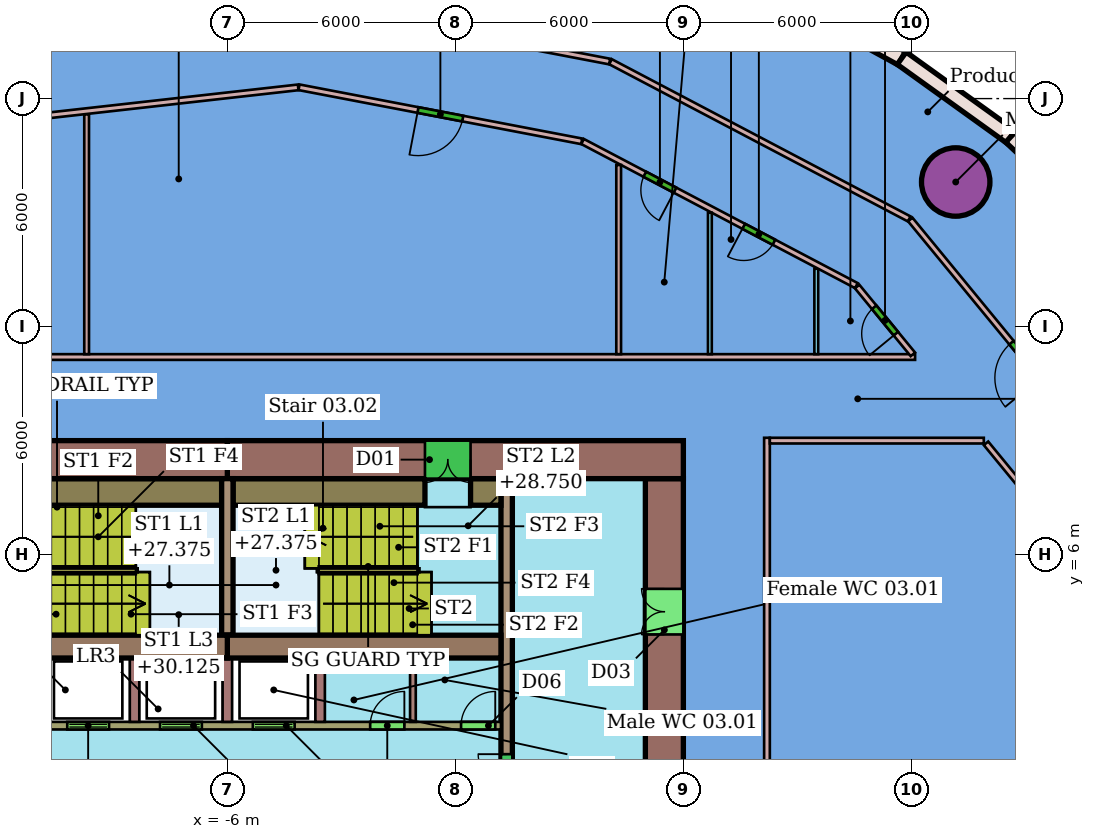
"""IFC4 building model, lengths in metres.
Left out: names, types, materials, properties, quantities, classifications, styles, units other than length and angle.
Written with IfcOpenShell. Run it as: python <this file> out.ifc"""

import sys

from ifc_helpers import new_model, si_unit, direction, frame, frame_2d, origin, origin_2d, place, context, subcontext, project, spatial, rectangle, hollow_circle, extrude, element, fill, save


model = new_model("IFC4")
c1 = context("Model", 3, precision=1e-05, world=origin(), true_north=direction((0.0, 1.0)))
c2 = subcontext(c1, "Body", "Model", "MODEL_VIEW")
j1 = project(units=[si_unit("LENGTHUNIT", "METRE"), si_unit("PLANEANGLEUNIT", "RADIAN")], contexts=[c1])
p1 = place(None, origin())
s1 = spatial("IfcSite", under=j1, at=p1, CompositionType="ELEMENT")
p2 = place(p1, origin())
s2 = spatial("IfcBuilding", under=s1, at=p2, CompositionType="ELEMENT")
p3 = place(p2, frame((0.0, 0.0, 26.0)))
s3 = spatial("IfcBuildingStorey", under=s2, at=p3, CompositionType="ELEMENT", Elevation=26.0)
p4 = place(p3, frame((13.166, 15.805, 0.0), z_axis=(0.0, 0.0, 1.0), x_axis=(1.0, 0.0, 0.0)))
e1 = element("IfcColumn", 1, at=p4, inside=s3, PredefinedType="COLUMN", context=c2, shape_type="SweptSolid", body=[
    extrude(hollow_circle(Radius=0.9, WallThickness=0.06, at=origin_2d()), origin(), (0.0, 0.0, 1.0), 5.3),
])
p5 = place(p3, frame((-20.275, 11.2, 0.0), z_axis=(0.0, 0.0, 1.0), x_axis=(1.0, 0.0, 0.0)))
e2 = element("IfcWall", 2, at=p5, inside=s3, PredefinedType="PARTITIONING", context=c2, shape_type="SweptSolid", body=[
    extrude(rectangle(XDim=32.372, YDim=0.15, at=frame_2d((16.186, 0.0))), origin(), (0.0, 0.0, 1.0), 4.6),
])
p6 = place(p3, frame((8.2, -11.275, 0.0), z_axis=(0.0, 0.0, 1.0), x_axis=(0.0, 1.0, 0.0)))
e3 = element("IfcWall", 3, at=p6, inside=s3, PredefinedType="PARTITIONING", context=c2, shape_type="SweptSolid", body=[
    extrude(rectangle(XDim=20.35, YDim=0.15, at=frame_2d((10.175, 0.0))), origin(), (0.0, 0.0, 1.0), 4.6),
])
p7 = place(p3, frame((8.275, 9.0, 0.0), z_axis=(0.0, 0.0, 1.0), x_axis=(1.0, 0.0, 0.0)))
e4 = element("IfcWall", 4, at=p7, inside=s3, PredefinedType="PARTITIONING", context=c2, shape_type="SweptSolid", body=[
    extrude(rectangle(XDim=5.631, YDim=0.15, at=frame_2d((2.815, 0.0))), origin(), (0.0, 0.0, 1.0), 4.6),
])
p8 = place(p3, frame((9.497, 11.275, 0.0), z_axis=(0.0, 0.0, 1.0), x_axis=(0.0, 1.0, 0.0)))
e5 = element("IfcWall", 5, at=p8, inside=s3, PredefinedType="PARTITIONING", context=c2, shape_type="SweptSolid", body=[
    extrude(rectangle(XDim=2.248, YDim=0.1, at=frame_2d((1.124, 0.0))), origin(), (0.0, 0.0, 1.0), 4.6),
])
p9 = place(p3, frame((12.039, 11.271, 0.0), z_axis=(0.0, 0.0, 1.0), x_axis=(-0.634980634047, 0.772528054109, 0.0)))
e6 = element("IfcWall", 6, at=p9, inside=s3, PredefinedType="PARTITIONING", context=c2, shape_type="SweptSolid", body=[
    extrude(rectangle(XDim=2.309, YDim=0.15, at=frame_2d((1.155, 0.0))), origin(), (0.0, 0.0, 1.0), 4.6),
])
p10 = place(p9, frame((0.705, 0.0, 0.0)))
e7 = element("IfcOpeningElement", 7, at=p10, cuts=e6, PredefinedType="OPENING", context=c2, shape_type="SweptSolid", body=[
    extrude(rectangle(XDim=0.9, YDim=2.1, at=frame_2d((0.45, 1.05))), frame((0.0, 0.085, 0.0), z_axis=(0.0, -1.0, 0.0), x_axis=(1.0, 0.0, 0.0)), (0.0, 0.0, 1.0), 0.17),
])
p11 = place(p3, frame((13.964, 8.929, 0.0), z_axis=(0.0, 0.0, 1.0), x_axis=(0.635017397711, -0.772497834692, 0.0)))
e8 = element("IfcWall", 8, at=p11, inside=s3, PredefinedType="PARTITIONING", context=c2, shape_type="SweptSolid", body=[
    extrude(rectangle(XDim=3.09, YDim=0.15, at=frame_2d((1.545, 0.0))), origin(), (0.0, 0.0, 1.0), 4.6),
])
p12 = place(p3, frame((10.553, 13.079, 0.0), z_axis=(0.0, 0.0, 1.0), x_axis=(-0.884926027541, 0.46573160273, 0.0)))
e9 = element("IfcWall", 9, at=p12, inside=s3, PredefinedType="PARTITIONING", context=c2, shape_type="SweptSolid", body=[
    extrude(rectangle(XDim=8.142, YDim=0.15, at=frame_2d((4.071, 0.0))), origin(), (0.0, 0.0, 1.0), 4.6),
])
p13 = place(p12, frame((2.451, 0.0, 0.0)))
e10 = element("IfcOpeningElement", 10, at=p13, cuts=e9, PredefinedType="OPENING", context=c2, shape_type="SweptSolid", body=[
    extrude(rectangle(XDim=0.9, YDim=2.1, at=frame_2d((0.45, 1.05))), frame((0.0, 0.085, 0.0), z_axis=(0.0, -1.0, 0.0), x_axis=(1.0, 0.0, 0.0)), (0.0, 0.0, 1.0), 0.17),
])
p14 = place(p12, frame((5.392, 0.0, 0.0)))
e11 = element("IfcOpeningElement", 11, at=p14, cuts=e9, PredefinedType="OPENING", context=c2, shape_type="SweptSolid", body=[
    extrude(rectangle(XDim=0.9, YDim=2.1, at=frame_2d((0.45, 1.05))), frame((0.0, 0.085, 0.0), z_axis=(0.0, -1.0, 0.0), x_axis=(1.0, 0.0, 0.0)), (0.0, 0.0, 1.0), 0.17),
])
p15 = place(p3, frame((6.697, 11.275, 0.0), z_axis=(0.0, 0.0, 1.0), x_axis=(0.0, 1.0, 0.0)))
e12 = element("IfcWall", 12, at=p15, inside=s3, PredefinedType="PARTITIONING", context=c2, shape_type="SweptSolid", body=[
    extrude(rectangle(XDim=3.722, YDim=0.1, at=frame_2d((1.861, 0.0))), origin(), (0.0, 0.0, 1.0), 4.6),
])
p16 = place(p3, frame((4.297, 11.275, 0.0), z_axis=(0.0, 0.0, 1.0), x_axis=(0.0, 1.0, 0.0)))
e13 = element("IfcWall", 13, at=p16, inside=s3, PredefinedType="PARTITIONING", context=c2, shape_type="SweptSolid", body=[
    extrude(rectangle(XDim=4.979, YDim=0.125, at=frame_2d((2.489, 0.0))), origin(), (0.0, 0.0, 1.0), 4.6),
])
p17 = place(p3, frame((-9.703, 11.275, 0.0), z_axis=(0.0, 0.0, 1.0), x_axis=(0.0, 1.0, 0.0)))
e14 = element("IfcWall", 14, at=p17, inside=s3, PredefinedType="PARTITIONING", context=c2, shape_type="SweptSolid", body=[
    extrude(rectangle(XDim=6.313, YDim=0.125, at=frame_2d((3.156, 0.0))), origin(), (0.0, 0.0, 1.0), 4.6),
])
p18 = place(p3, frame((3.325, 16.875, 0.0), z_axis=(0.0, 0.0, 1.0), x_axis=(-0.982205706766, 0.187808278828, 0.0)))
e15 = element("IfcWall", 15, at=p18, inside=s3, PredefinedType="PARTITIONING", context=c2, shape_type="SweptSolid", body=[
    extrude(rectangle(XDim=7.573, YDim=0.15, at=frame_2d((3.787, 0.0))), origin(), (0.0, 0.0, 1.0), 4.6),
])
p19 = place(p18, frame((3.187, 0.0, 0.0)))
e16 = element("IfcOpeningElement", 16, at=p19, cuts=e15, PredefinedType="OPENING", context=c2, shape_type="SweptSolid", body=[
    extrude(rectangle(XDim=1.2, YDim=2.1, at=frame_2d((0.6, 1.05))), frame((0.0, 0.085, 0.0), z_axis=(0.0, -1.0, 0.0), x_axis=(1.0, 0.0, 0.0)), (0.0, 0.0, 1.0), 0.17),
])
p20 = place(p3, frame((-11.425, 17.477, 0.0), z_axis=(0.0, 0.0, 1.0), x_axis=(0.993762158865, 0.111520274427, 0.0)))
e17 = element("IfcWall", 17, at=p20, inside=s3, PredefinedType="PARTITIONING", context=c2, shape_type="SweptSolid", body=[
    extrude(rectangle(XDim=7.334, YDim=0.15, at=frame_2d((3.667, 0.0))), origin(), (0.0, 0.0, 1.0), 4.6),
])
p21 = place(p3, frame((18.06, 7.411, 0.0), z_axis=(0.0, 0.0, 1.0), x_axis=(-0.63502168635, 0.772494309277, 0.0)))
e18 = element("IfcWall", 18, at=p21, inside=s3, PredefinedType="PARTITIONING", context=c2, shape_type="SweptSolid", body=[
    extrude(rectangle(XDim=9.59, YDim=0.15, at=frame_2d((4.795, 0.0))), origin(), (0.0, 0.0, 1.0), 4.6),
])
p22 = place(p21, frame((4.195, 0.0, 0.0)))
e19 = element("IfcOpeningElement", 19, at=p22, cuts=e18, PredefinedType="OPENING", context=c2, shape_type="SweptSolid", body=[
    extrude(rectangle(XDim=1.2, YDim=2.1, at=frame_2d((0.6, 1.05))), frame((0.0, 0.085, 0.0), z_axis=(0.0, -1.0, 0.0), x_axis=(1.0, 0.0, 0.0)), (0.0, 0.0, 1.0), 0.17),
])
p23 = place(p3, frame((4.083, 18.97, 0.0), z_axis=(0.0, 0.0, 1.0), x_axis=(0.884920607371, -0.465741901326, 0.0)))
e20 = element("IfcWall", 20, at=p23, inside=s3, PredefinedType="PARTITIONING", context=c2, shape_type="SweptSolid", body=[
    extrude(rectangle(XDim=8.882, YDim=0.15, at=frame_2d((4.441, 0.0))), origin(), (0.0, 0.0, 1.0), 4.6),
])
p24 = place(p3, frame((-4.028, 20.521, 0.0), z_axis=(0.0, 0.0, 1.0), x_axis=(0.982207009241, -0.187801466976, 0.0)))
e21 = element("IfcWall", 21, at=p24, inside=s3, PredefinedType="PARTITIONING", context=c2, shape_type="SweptSolid", body=[
    extrude(rectangle(XDim=8.234, YDim=0.15, at=frame_2d((4.117, 0.0))), origin(), (0.0, 0.0, 1.0), 4.6),
])
p25 = place(p3, frame((8.571, 20.8, 0.0), z_axis=(0.0, 0.0, 1.0), x_axis=(0.87711318505, -0.48028372928, 0.0)))
e22 = element("IfcWall", 22, at=p25, inside=s3, PredefinedType="SOLIDWALL", context=c2, shape_type="SweptSolid", body=[
    extrude(rectangle(XDim=3.619, YDim=0.4, at=frame_2d((1.809, 0.0))), origin(), (0.0, 0.0, 1.0), 4.9),
])
p26 = place(p3, frame((11.745, 19.062, 0.0), z_axis=(0.0, 0.0, 1.0), x_axis=(0.81205624831, -0.583579171648, 0.0)))
e23 = element("IfcWall", 23, at=p26, inside=s3, PredefinedType="SOLIDWALL", context=c2, shape_type="SweptSolid", body=[
    extrude(rectangle(XDim=3.538, YDim=0.4, at=frame_2d((1.769, 0.0))), origin(), (0.0, 0.0, 1.0), 4.9),
])
p27 = place(p3, frame((14.618, 16.997, 0.0), z_axis=(0.0, 0.0, 1.0), x_axis=(0.730641209912, -0.682761614605, 0.0)))
e24 = element("IfcWall", 24, at=p27, inside=s3, PredefinedType="SOLIDWALL", context=c2, shape_type="SweptSolid", body=[
    extrude(rectangle(XDim=3.452, YDim=0.4, at=frame_2d((1.726, 0.0))), origin(), (0.0, 0.0, 1.0), 4.9),
])
p28 = place(p3, frame((6.0, 8.5, 0.0), z_axis=(0.0, 0.0, 1.0), x_axis=(-1.0, 0.0, 0.0)))
e25 = element("IfcWall", 25, at=p28, inside=s3, PredefinedType="SHEAR", context=c2, shape_type="SweptSolid", body=[
    extrude(rectangle(XDim=12.0, YDim=1.0, at=frame_2d((6.0, 0.0))), origin(), (0.0, 0.0, 1.0), 5.2),
])
p29 = place(p28, frame((5.6, 0.0, 0.0)))
e26 = element("IfcOpeningElement", 26, at=p29, cuts=e25, PredefinedType="OPENING", context=c2, shape_type="SweptSolid", body=[
    extrude(rectangle(XDim=1.2, YDim=2.1, at=frame_2d((0.6, 1.05))), frame((0.0, 0.51, 0.0), z_axis=(0.0, -1.0, 0.0), x_axis=(1.0, 0.0, 0.0)), (0.0, 0.0, 1.0), 1.02),
])
p30 = place(p3, frame((-6.0, 8.5, 0.0), z_axis=(0.0, 0.0, 1.0), x_axis=(-1.0, 0.0, 0.0)))
e27 = element("IfcWall", 27, at=p30, inside=s3, PredefinedType="SHEAR", context=c2, shape_type="SweptSolid", body=[
    extrude(rectangle(XDim=12.0, YDim=1.0, at=frame_2d((6.0, 0.0))), origin(), (0.0, 0.0, 1.0), 5.2),
])
p31 = place(p30, frame((5.2, 0.0, 0.0)))
e28 = element("IfcOpeningElement", 28, at=p31, cuts=e27, PredefinedType="OPENING", context=c2, shape_type="SweptSolid", body=[
    extrude(rectangle(XDim=1.2, YDim=2.1, at=frame_2d((0.6, 1.05))), frame((0.0, 0.51, 0.0), z_axis=(0.0, -1.0, 0.0), x_axis=(1.0, 0.0, 0.0)), (0.0, 0.0, 1.0), 1.02),
])
p32 = place(p3, frame((5.5, -8.0, 0.0), z_axis=(0.0, 0.0, 1.0), x_axis=(0.0, 1.0, 0.0)))
e29 = element("IfcWall", 29, at=p32, inside=s3, PredefinedType="SHEAR", context=c2, shape_type="SweptSolid", body=[
    extrude(rectangle(XDim=16.0, YDim=1.0, at=frame_2d((8.0, 0.0))), origin(), (0.0, 0.0, 1.0), 5.2),
])
p33 = place(p32, frame((2.9, 0.0, 0.0)))
e30 = element("IfcOpeningElement", 30, at=p33, cuts=e29, PredefinedType="OPENING", context=c2, shape_type="SweptSolid", body=[
    extrude(rectangle(XDim=1.2, YDim=2.1, at=frame_2d((0.6, 1.05))), frame((0.0, 0.51, 0.0), z_axis=(0.0, -1.0, 0.0), x_axis=(1.0, 0.0, 0.0)), (0.0, 0.0, 1.0), 1.02),
])
p34 = place(p32, frame((11.9, 0.0, 0.0)))
e31 = element("IfcOpeningElement", 31, at=p34, cuts=e29, PredefinedType="OPENING", context=c2, shape_type="SweptSolid", body=[
    extrude(rectangle(XDim=1.2, YDim=2.1, at=frame_2d((0.6, 1.05))), frame((0.0, 0.51, 0.0), z_axis=(0.0, -1.0, 0.0), x_axis=(1.0, 0.0, 0.0)), (0.0, 0.0, 1.0), 1.02),
])
for number, where, z_axis, x_axis in (
    (32, (-13.2, 3.58, 0.0), (0.0, 0.0, 1.0), (1.0, 0.0, 0.0)),
    (33, (-6.0, 3.58, 0.0), (0.0, 0.0, 1.0), (1.0, 0.0, 0.0)),
):
    element("IfcWall", number, at=place(p3, frame(where, z_axis=z_axis, x_axis=x_axis)), inside=s3, PredefinedType="SHEAR", context=c2, shape_type="SweptSolid", body=[
        extrude(rectangle(XDim=7.2, YDim=0.6, at=frame_2d((3.6, 0.0))), origin(), (0.0, 0.0, 1.0), 5.2),
    ])
p35 = place(p3, frame((1.35, -8.0, 0.0), z_axis=(0.0, 0.0, 1.0), x_axis=(0.0, 1.0, 0.0)))
e34 = element("IfcWall", 34, at=p35, inside=s3, PredefinedType="SHEAR", context=c2, shape_type="SweptSolid", body=[
    extrude(rectangle(XDim=16.0, YDim=0.3, at=frame_2d((8.0, 0.0))), origin(), (0.0, 0.0, 1.0), 5.2),
])
p36 = place(p35, frame((1.91, 0.0, 0.0)))
e35 = element("IfcOpeningElement", 35, at=p36, cuts=e34, PredefinedType="OPENING", context=c2, shape_type="SweptSolid", body=[
    extrude(rectangle(XDim=1.0, YDim=2.1, at=frame_2d((0.5, 1.05))), frame((0.0, 0.16, 0.0), z_axis=(0.0, -1.0, 0.0), x_axis=(1.0, 0.0, 0.0)), (0.0, 0.0, 1.0), 0.32),
])
p37 = place(p35, frame((7.25, 0.0, 0.0)))
e36 = element("IfcOpeningElement", 36, at=p37, cuts=e34, PredefinedType="OPENING", context=c2, shape_type="SweptSolid", body=[
    extrude(rectangle(XDim=1.5, YDim=2.1, at=frame_2d((0.75, 1.05))), frame((0.0, 0.16, 0.0), z_axis=(0.0, -1.0, 0.0), x_axis=(1.0, 0.0, 0.0)), (0.0, 0.0, 1.0), 0.32),
])
p38 = place(p3, frame((-13.2, 1.5, 0.0), z_axis=(0.0, 0.0, 1.0), x_axis=(1.0, 0.0, 0.0)))
e37 = element("IfcWall", 37, at=p38, inside=s3, PredefinedType="SHEAR", context=c2, shape_type="SweptSolid", body=[
    extrude(rectangle(XDim=14.4, YDim=0.2, at=frame_2d((7.2, 0.0))), origin(), (0.0, 0.0, 1.0), 5.2),
])
p39 = place(p38, frame((0.546, 0.0, 0.0)))
e38 = element("IfcOpeningElement", 38, at=p39, cuts=e37, PredefinedType="OPENING", context=c2, shape_type="SweptSolid", body=[
    extrude(rectangle(XDim=1.1, YDim=2.1, at=frame_2d((0.55, 1.05))), frame((0.0, 0.11, 0.0), z_axis=(0.0, -1.0, 0.0), x_axis=(1.0, 0.0, 0.0)), (0.0, 0.0, 1.0), 0.22),
])
p40 = place(p38, frame((2.988, 0.0, 0.0)))
e39 = element("IfcOpeningElement", 39, at=p40, cuts=e37, PredefinedType="OPENING", context=c2, shape_type="SweptSolid", body=[
    extrude(rectangle(XDim=1.1, YDim=2.1, at=frame_2d((0.55, 1.05))), frame((0.0, 0.11, 0.0), z_axis=(0.0, -1.0, 0.0), x_axis=(1.0, 0.0, 0.0)), (0.0, 0.0, 1.0), 0.22),
])
p41 = place(p38, frame((5.429, 0.0, 0.0)))
e40 = element("IfcOpeningElement", 40, at=p41, cuts=e37, PredefinedType="OPENING", context=c2, shape_type="SweptSolid", body=[
    extrude(rectangle(XDim=1.1, YDim=2.1, at=frame_2d((0.55, 1.05))), frame((0.0, 0.11, 0.0), z_axis=(0.0, -1.0, 0.0), x_axis=(1.0, 0.0, 0.0)), (0.0, 0.0, 1.0), 0.22),
])
p42 = place(p38, frame((7.871, 0.0, 0.0)))
e41 = element("IfcOpeningElement", 41, at=p42, cuts=e37, PredefinedType="OPENING", context=c2, shape_type="SweptSolid", body=[
    extrude(rectangle(XDim=1.1, YDim=2.1, at=frame_2d((0.55, 1.05))), frame((0.0, 0.11, 0.0), z_axis=(0.0, -1.0, 0.0), x_axis=(1.0, 0.0, 0.0)), (0.0, 0.0, 1.0), 0.22),
])
p43 = place(p38, frame((10.958, 0.0, 0.0)))
e42 = element("IfcOpeningElement", 42, at=p43, cuts=e37, PredefinedType="OPENING", context=c2, shape_type="SweptSolid", body=[
    extrude(rectangle(XDim=0.9, YDim=2.1, at=frame_2d((0.45, 1.05))), frame((0.0, 0.11, 0.0), z_axis=(0.0, -1.0, 0.0), x_axis=(1.0, 0.0, 0.0)), (0.0, 0.0, 1.0), 0.22),
])
p44 = place(p38, frame((13.35, 0.0, 0.0)))
e43 = element("IfcOpeningElement", 43, at=p44, cuts=e37, PredefinedType="OPENING", context=c2, shape_type="SweptSolid", body=[
    extrude(rectangle(XDim=0.9, YDim=2.1, at=frame_2d((0.45, 1.05))), frame((0.0, 0.11, 0.0), z_axis=(0.0, -1.0, 0.0), x_axis=(1.0, 0.0, 0.0)), (0.0, 0.0, 1.0), 0.22),
])
p45 = place(p3, frame((-6.0, 3.88, 0.0), z_axis=(0.0, 0.0, 1.0), x_axis=(0.0, 1.0, 0.0)))
e44 = element("IfcWall", 44, at=p45, inside=s3, PredefinedType="SHEAR", context=c2, shape_type="SweptSolid", body=[
    extrude(rectangle(XDim=4.12, YDim=0.3, at=frame_2d((2.06, 0.0))), origin(), (0.0, 0.0, 1.0), 5.2),
])
for number, where, z_axis, x_axis in (
    (45, (-11.2, 7.65, 0.0), (0.0, 0.0, 1.0), (1.0, 0.0, 0.0)),
    (46, (-5.85, 7.65, 0.0), (0.0, 0.0, 1.0), (1.0, 0.0, 0.0)),
):
    element("IfcWall", number, at=place(p3, frame(where, z_axis=z_axis, x_axis=x_axis)), inside=s3, PredefinedType="SHEAR", context=c2, shape_type="SweptSolid", body=[
        extrude(rectangle(XDim=5.05, YDim=0.7, at=frame_2d((2.525, 0.0))), origin(), (0.0, 0.0, 1.0), 5.2),
    ])
p46 = place(p3, frame((0.4, 7.65, 0.0), z_axis=(0.0, 0.0, 1.0), x_axis=(1.0, 0.0, 0.0)))
e47 = element("IfcWall", 47, at=p46, inside=s3, PredefinedType="SHEAR", context=c2, shape_type="SweptSolid", body=[
    extrude(rectangle(XDim=0.8, YDim=0.7, at=frame_2d((0.4, 0.0))), origin(), (0.0, 0.0, 1.0), 5.2),
])
for number, where, z_axis, x_axis in (
    (48, (-8.442, 1.6, 0.0), (0.0, 0.0, 1.0), (0.0, 1.0, 0.0)),
    (49, (-6.0, 1.6, 0.0), (0.0, 0.0, 1.0), (0.0, 1.0, 0.0)),
    (50, (-3.558, 1.6, 0.0), (0.0, 0.0, 1.0), (0.0, 1.0, 0.0)),
):
    element("IfcWall", number, at=place(p3, frame(where, z_axis=z_axis, x_axis=x_axis)), inside=s3, PredefinedType="SHEAR", context=c2, shape_type="SweptSolid", body=[
        extrude(rectangle(XDim=1.68, YDim=0.25, at=frame_2d((0.84, 0.0))), origin(), (0.0, 0.0, 1.0), 5.2),
    ])
p47 = place(p3, frame((-1.117, 1.6, 0.0), z_axis=(0.0, 0.0, 1.0), x_axis=(0.0, 1.0, 0.0)))
e51 = element("IfcWall", 51, at=p47, inside=s3, PredefinedType="PARTITIONING", context=c2, shape_type="SweptSolid", body=[
    extrude(rectangle(XDim=1.68, YDim=0.15, at=frame_2d((0.84, 0.0))), origin(), (0.0, 0.0, 1.0), 5.2),
])
p48 = place(p10, origin())
e52 = element("IfcDoor", 52, at=p48, inside=s3, OperationType="SINGLE_SWING_LEFT", PredefinedType="DOOR", context=c2, shape_type="SweptSolid", body=[
    extrude(rectangle(XDim=0.9, YDim=2.1, at=frame_2d((0.45, 1.05))), frame((0.0, 0.025, 0.0), z_axis=(0.0, -1.0, 0.0), x_axis=(1.0, 0.0, 0.0)), (0.0, 0.0, 1.0), 0.05),
])
fill(e7, e52)
p49 = place(p13, origin())
e53 = element("IfcDoor", 53, at=p49, inside=s3, OperationType="SINGLE_SWING_RIGHT", PredefinedType="DOOR", context=c2, shape_type="SweptSolid", body=[
    extrude(rectangle(XDim=0.9, YDim=2.1, at=frame_2d((0.45, 1.05))), frame((0.0, 0.025, 0.0), z_axis=(0.0, -1.0, 0.0), x_axis=(1.0, 0.0, 0.0)), (0.0, 0.0, 1.0), 0.05),
])
fill(e10, e53)
p50 = place(p14, origin())
e54 = element("IfcDoor", 54, at=p50, inside=s3, OperationType="SINGLE_SWING_LEFT", PredefinedType="DOOR", context=c2, shape_type="SweptSolid", body=[
    extrude(rectangle(XDim=0.9, YDim=2.1, at=frame_2d((0.45, 1.05))), frame((0.0, 0.025, 0.0), z_axis=(0.0, -1.0, 0.0), x_axis=(1.0, 0.0, 0.0)), (0.0, 0.0, 1.0), 0.05),
])
fill(e11, e54)
p51 = place(p19, origin())
e55 = element("IfcDoor", 55, at=p51, inside=s3, OperationType="SINGLE_SWING_RIGHT", PredefinedType="DOOR", context=c2, shape_type="SweptSolid", body=[
    extrude(rectangle(XDim=1.2, YDim=2.1, at=frame_2d((0.6, 1.05))), frame((0.0, 0.025, 0.0), z_axis=(0.0, -1.0, 0.0), x_axis=(1.0, 0.0, 0.0)), (0.0, 0.0, 1.0), 0.05),
])
fill(e16, e55)
p52 = place(p22, origin())
e56 = element("IfcDoor", 56, at=p52, inside=s3, OperationType="SINGLE_SWING_LEFT", PredefinedType="DOOR", context=c2, shape_type="SweptSolid", body=[
    extrude(rectangle(XDim=1.2, YDim=2.1, at=frame_2d((0.6, 1.05))), frame((0.0, 0.025, 0.0), z_axis=(0.0, -1.0, 0.0), x_axis=(1.0, 0.0, 0.0)), (0.0, 0.0, 1.0), 0.05),
])
fill(e19, e56)
p53 = place(p29, origin())
e57 = element("IfcDoor", 57, at=p53, inside=s3, OperationType="DOUBLE_DOOR_SINGLE_SWING", PredefinedType="NOTDEFINED", context=c2, shape_type="SweptSolid", body=[
    extrude(rectangle(XDim=1.2, YDim=2.1, at=frame_2d((0.6, 1.05))), frame((0.0, 0.025, 0.0), z_axis=(0.0, -1.0, 0.0), x_axis=(1.0, 0.0, 0.0)), (0.0, 0.0, 1.0), 0.05),
])
fill(e26, e57)
p54 = place(p34, origin())
e58 = element("IfcDoor", 58, at=p54, inside=s3, OperationType="DOUBLE_DOOR_SINGLE_SWING", PredefinedType="NOTDEFINED", context=c2, shape_type="SweptSolid", body=[
    extrude(rectangle(XDim=1.2, YDim=2.1, at=frame_2d((0.6, 1.05))), frame((0.0, 0.025, 0.0), z_axis=(0.0, -1.0, 0.0), x_axis=(1.0, 0.0, 0.0)), (0.0, 0.0, 1.0), 0.05),
])
fill(e31, e58)
p55 = place(p37, origin())
e59 = element("IfcDoor", 59, at=p55, inside=s3, OperationType="DOUBLE_DOOR_SINGLE_SWING", PredefinedType="NOTDEFINED", context=c2, shape_type="SweptSolid", body=[
    extrude(rectangle(XDim=1.5, YDim=2.1, at=frame_2d((0.75, 1.05))), frame((0.0, 0.025, 0.0), z_axis=(0.0, -1.0, 0.0), x_axis=(1.0, 0.0, 0.0)), (0.0, 0.0, 1.0), 0.05),
])
fill(e36, e59)
p56 = place(p40, origin())
e60 = element("IfcDoor", 60, at=p56, inside=s3, OperationType="DOUBLE_DOOR_SLIDING", PredefinedType="NOTDEFINED", context=c2, shape_type="SweptSolid", body=[
    extrude(rectangle(XDim=1.1, YDim=2.1, at=frame_2d((0.55, 1.05))), frame((0.0, 0.025, 0.0), z_axis=(0.0, -1.0, 0.0), x_axis=(1.0, 0.0, 0.0)), (0.0, 0.0, 1.0), 0.05),
])
fill(e39, e60)
p57 = place(p41, origin())
e61 = element("IfcDoor", 61, at=p57, inside=s3, OperationType="DOUBLE_DOOR_SLIDING", PredefinedType="NOTDEFINED", context=c2, shape_type="SweptSolid", body=[
    extrude(rectangle(XDim=1.1, YDim=2.1, at=frame_2d((0.55, 1.05))), frame((0.0, 0.025, 0.0), z_axis=(0.0, -1.0, 0.0), x_axis=(1.0, 0.0, 0.0)), (0.0, 0.0, 1.0), 0.05),
])
fill(e40, e61)
p58 = place(p42, origin())
e62 = element("IfcDoor", 62, at=p58, inside=s3, OperationType="DOUBLE_DOOR_SLIDING", PredefinedType="NOTDEFINED", context=c2, shape_type="SweptSolid", body=[
    extrude(rectangle(XDim=1.1, YDim=2.1, at=frame_2d((0.55, 1.05))), frame((0.0, 0.025, 0.0), z_axis=(0.0, -1.0, 0.0), x_axis=(1.0, 0.0, 0.0)), (0.0, 0.0, 1.0), 0.05),
])
fill(e41, e62)
p59 = place(p43, origin())
e63 = element("IfcDoor", 63, at=p59, inside=s3, OperationType="SINGLE_SWING_RIGHT", PredefinedType="NOTDEFINED", context=c2, shape_type="SweptSolid", body=[
    extrude(rectangle(XDim=0.9, YDim=2.1, at=frame_2d((0.45, 1.05))), frame((0.0, 0.025, 0.0), z_axis=(0.0, -1.0, 0.0), x_axis=(1.0, 0.0, 0.0)), (0.0, 0.0, 1.0), 0.05),
])
fill(e42, e63)
p60 = place(p44, origin())
e64 = element("IfcDoor", 64, at=p60, inside=s3, OperationType="SINGLE_SWING_RIGHT", PredefinedType="NOTDEFINED", context=c2, shape_type="SweptSolid", body=[
    extrude(rectangle(XDim=0.9, YDim=2.1, at=frame_2d((0.45, 1.05))), frame((0.0, 0.025, 0.0), z_axis=(0.0, -1.0, 0.0), x_axis=(1.0, 0.0, 0.0)), (0.0, 0.0, 1.0), 0.05),
])
fill(e43, e64)
save(model, sys.argv[1])
